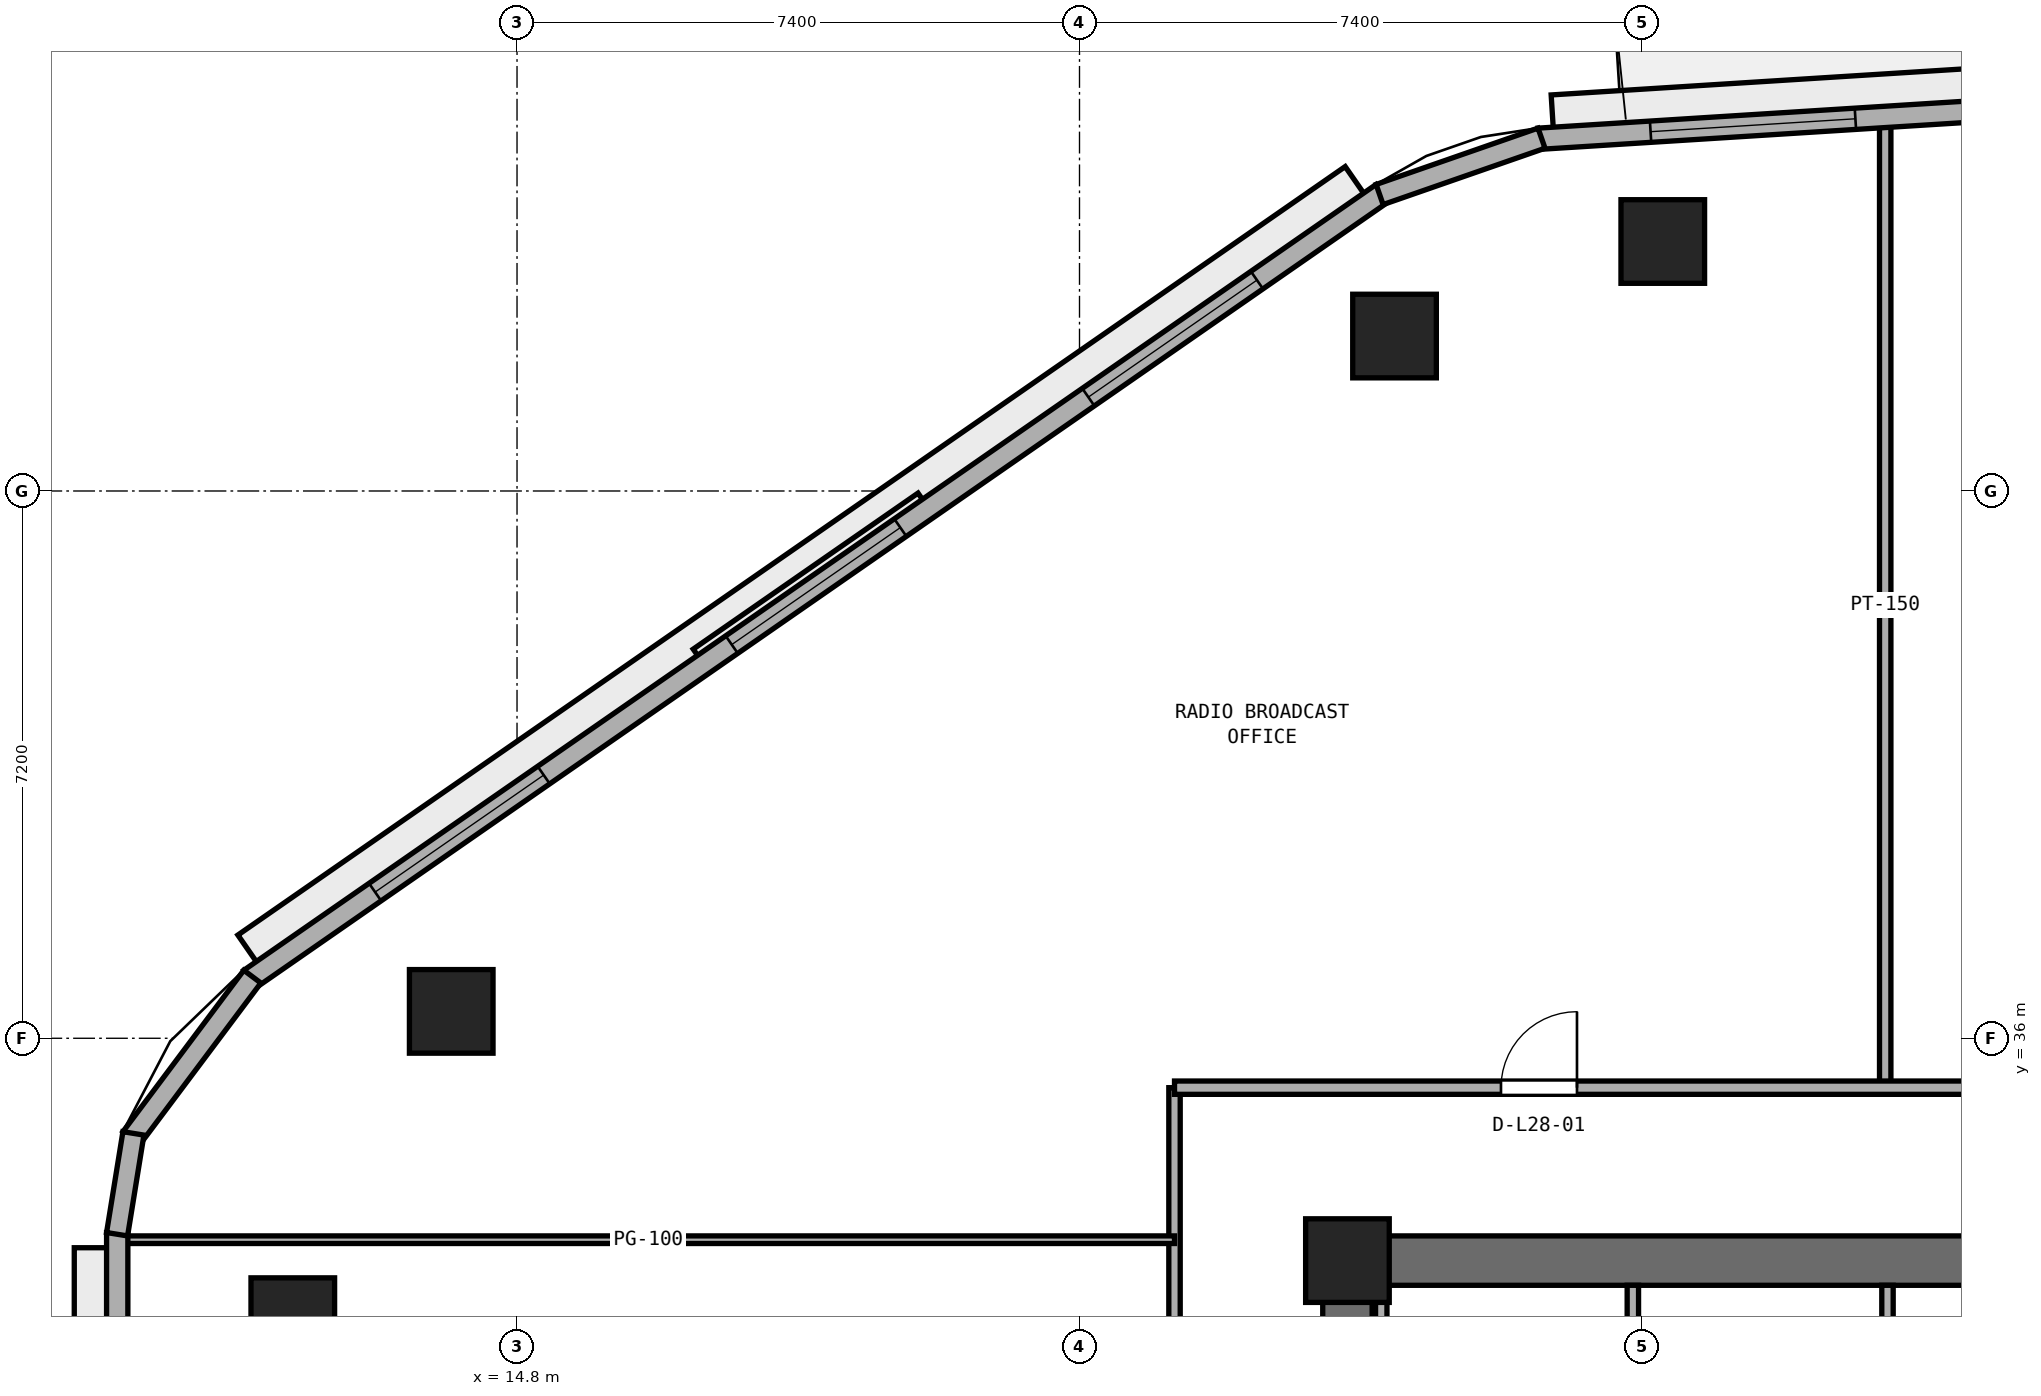
"""IFC4 building model, lengths in metres.
Left out: names, types, materials, properties, quantities, classifications, styles, units other than length and angle.
Written with IfcOpenShell. Run it as: python <this file> out.ifc"""

import sys

from ifc_helpers import new_model, si_unit, direction, frame, frame_2d, origin, origin_2d, place, context, subcontext, project, spatial, rectangle, extrude, element, fill, save


model = new_model("IFC4")
c1 = context("Model", 3, precision=1e-05, world=origin(), true_north=direction((0.0, 1.0)))
c2 = subcontext(c1, "Body", "Model", "MODEL_VIEW")
j1 = project(units=[si_unit("LENGTHUNIT", "METRE"), si_unit("PLANEANGLEUNIT", "RADIAN")], contexts=[c1])
p1 = place(None, origin())
s1 = spatial("IfcSite", under=j1, at=p1, CompositionType="ELEMENT")
p2 = place(p1, origin())
s2 = spatial("IfcBuilding", under=s1, at=p2, CompositionType="ELEMENT")
p3 = place(p2, frame((0.0, 0.0, 112.4)))
s3 = spatial("IfcBuildingStorey", under=s2, at=p3, CompositionType="ELEMENT", Elevation=112.4)
p4 = place(p3, frame((25.4, 33.075, 0.0), z_axis=(0.0, 0.0, 1.0), x_axis=(1.0, 0.0, 0.0)))
e1 = element("IfcWall", 1, at=p4, inside=s3, PredefinedType="SHEAR", context=c2, shape_type="SweptSolid", body=[
    extrude(rectangle(XDim=23.2, YDim=0.65, at=frame_2d((11.6, 0.0))), origin(), (0.0, 0.0, 1.0), 3.525),
])
p5 = place(p3, frame((25.725, 17.65, 0.0), z_axis=(0.0, 0.0, 1.0), x_axis=(0.0, 1.0, 0.0)))
e2 = element("IfcWall", 2, at=p5, inside=s3, PredefinedType="SHEAR", context=c2, shape_type="SweptSolid", body=[
    extrude(rectangle(XDim=15.1, YDim=0.65, at=frame_2d((7.55, 0.0))), origin(), (0.0, 0.0, 1.0), 3.525),
])
p6 = place(p5, frame((6.8, 0.0, 0.0)))
e3 = element("IfcOpeningElement", 3, at=p6, cuts=e2, PredefinedType="OPENING", context=c2, shape_type="SweptSolid", body=[
    extrude(rectangle(XDim=1.5, YDim=2.15, at=frame_2d((0.75, 1.075))), frame((0.0, 0.335, 0.0), z_axis=(0.0, -1.0, 0.0), x_axis=(1.0, 0.0, 0.0)), (0.0, 0.0, 1.0), 0.67),
])
p7 = place(p3, frame((25.725, 33.075, 0.0), z_axis=(0.0, 0.0, 1.0), x_axis=(1.0, 0.0, 0.0)))
e4 = element("IfcColumn", 4, at=p7, inside=s3, PredefinedType="PILASTER", context=c2, shape_type="SweptSolid", body=[
    extrude(rectangle(XDim=1.1, YDim=1.1, at=origin_2d()), origin(), (0.0, 0.0, 1.0), 3.8),
])
for number, where, z_axis, x_axis in (
    (5, (29.874, 46.482, 0.0), (0.0, 0.0, 1.0), (1.0, 0.0, 0.0)),
    (6, (26.344, 45.238, 0.0), (0.0, 0.0, 1.0), (1.0, 0.0, 0.0)),
    (7, (13.934, 36.354, 0.0), (0.0, 0.0, 1.0), (1.0, 0.0, 0.0)),
    (8, (11.85, 32.298, 0.0), (0.0, 0.0, 1.0), (1.0, 0.0, 0.0)),
):
    element("IfcColumn", number, at=place(p3, frame(where, z_axis=z_axis, x_axis=x_axis)), inside=s3, PredefinedType="COLUMN", context=c2, shape_type="SweptSolid", body=[
        extrude(rectangle(XDim=1.1, YDim=1.1, at=origin_2d()), origin(), (0.0, 0.0, 1.0), 3.8),
    ])
for number, where, z_axis, x_axis in (
    (9, (26.17, 30.65, 0.0), (0.0, 0.0, 1.0), (0.0, 1.0, 0.0)),
    (10, (29.48, 30.65, 0.0), (0.0, 0.0, 1.0), (0.0, 1.0, 0.0)),
    (11, (32.83, 30.65, 0.0), (0.0, 0.0, 1.0), (0.0, 1.0, 0.0)),
):
    element("IfcWall", number, at=place(p3, frame(where, z_axis=z_axis, x_axis=x_axis)), inside=s3, PredefinedType="PARTITIONING", context=c2, shape_type="SweptSolid", body=[
        extrude(rectangle(XDim=2.1, YDim=0.15, at=frame_2d((1.05, 0.0))), origin(), (0.0, 0.0, 1.0), 3.525),
    ])
p8 = place(p3, frame((32.8, 35.35, 0.0), z_axis=(0.0, 0.0, 1.0), x_axis=(0.0, 1.0, 0.0)))
e12 = element("IfcWall", 12, at=p8, inside=s3, PredefinedType="PARTITIONING", context=c2, shape_type="SweptSolid", body=[
    extrude(rectangle(XDim=12.707, YDim=0.15, at=frame_2d((6.353, 0.0))), origin(), (0.0, 0.0, 1.0), 3.525),
])
p9 = place(p3, frame((23.45, 15.05, 0.0), z_axis=(0.0, 0.0, 1.0), x_axis=(0.0, 1.0, 0.0)))
e13 = element("IfcWall", 13, at=p9, inside=s3, PredefinedType="PARTITIONING", context=c2, shape_type="SweptSolid", body=[
    extrude(rectangle(XDim=20.3, YDim=0.15, at=frame_2d((10.15, 0.0))), origin(), (0.0, 0.0, 1.0), 3.525),
])
p10 = place(p9, frame((8.025, 0.0, 0.0)))
e14 = element("IfcOpeningElement", 14, at=p10, cuts=e13, PredefinedType="OPENING", context=c2, shape_type="SweptSolid", body=[
    extrude(rectangle(XDim=0.9, YDim=2.1, at=frame_2d((0.45, 1.05))), frame((0.0, 0.085, 0.0), z_axis=(0.0, -1.0, 0.0), x_axis=(1.0, 0.0, 0.0)), (0.0, 0.0, 1.0), 0.17),
])
p11 = place(p9, frame((16.175, 0.0, 0.0)))
e15 = element("IfcOpeningElement", 15, at=p11, cuts=e13, PredefinedType="OPENING", context=c2, shape_type="SweptSolid", body=[
    extrude(rectangle(XDim=0.9, YDim=2.1, at=frame_2d((0.45, 1.05))), frame((0.0, 0.085, 0.0), z_axis=(0.0, -1.0, 0.0), x_axis=(1.0, 0.0, 0.0)), (0.0, 0.0, 1.0), 0.17),
])
p12 = place(p3, frame((9.605, 33.35, 0.0), z_axis=(0.0, 0.0, 1.0), x_axis=(1.0, 0.0, 0.0)))
e16 = element("IfcWall", 16, at=p12, inside=s3, PredefinedType="PARTITIONING", context=c2, shape_type="SweptSolid", body=[
    extrude(rectangle(XDim=13.845, YDim=0.1, at=frame_2d((6.922, 0.0))), origin(), (0.0, 0.0, 1.0), 3.525),
])
p13 = place(p3, frame((23.45, 35.35, 0.0), z_axis=(0.0, 0.0, 1.0), x_axis=(1.0, 0.0, 0.0)))
e17 = element("IfcWall", 17, at=p13, inside=s3, PredefinedType="PARTITIONING", context=c2, shape_type="SweptSolid", body=[
    extrude(rectangle(XDim=27.1, YDim=0.175, at=frame_2d((13.55, 0.0))), origin(), (0.0, 0.0, 1.0), 3.525),
])
p14 = place(p13, frame((4.295, 0.0, 0.0)))
e18 = element("IfcOpeningElement", 18, at=p14, cuts=e17, PredefinedType="OPENING", context=c2, shape_type="SweptSolid", body=[
    extrude(rectangle(XDim=1.0, YDim=2.12, at=frame_2d((0.5, 1.06))), frame((0.0, 0.097, 0.0), z_axis=(0.0, -1.0, 0.0), x_axis=(1.0, 0.0, 0.0)), (0.0, 0.0, 1.0), 0.195),
])
p15 = place(p13, frame((14.6, 0.0, 0.0)))
e19 = element("IfcOpeningElement", 19, at=p15, cuts=e17, PredefinedType="OPENING", context=c2, shape_type="SweptSolid", body=[
    extrude(rectangle(XDim=1.0, YDim=2.12, at=frame_2d((0.5, 1.06))), frame((0.0, 0.097, 0.0), z_axis=(0.0, -1.0, 0.0), x_axis=(1.0, 0.0, 0.0)), (0.0, 0.0, 1.0), 0.195),
])
p16 = place(p13, frame((23.405, 0.0, 0.0)))
e20 = element("IfcOpeningElement", 20, at=p16, cuts=e17, PredefinedType="OPENING", context=c2, shape_type="SweptSolid", body=[
    extrude(rectangle(XDim=0.9, YDim=2.1, at=frame_2d((0.45, 1.05))), frame((0.0, 0.097, 0.0), z_axis=(0.0, -1.0, 0.0), x_axis=(1.0, 0.0, 0.0)), (0.0, 0.0, 1.0), 0.195),
])
p17 = place(p3, frame((47.832, 49.069, 0.0), z_axis=(0.0, 0.0, 1.0), x_axis=(-0.998017725054, -0.062933460723, 0.0)))
e21 = element("IfcWall", 21, at=p17, inside=s3, PredefinedType="STANDARD", context=c2, shape_type="SweptSolid", body=[
    extrude(rectangle(XDim=19.629, YDim=0.28, at=frame_2d((9.815, 0.0))), origin(), (0.0, 0.0, 1.0), 3.525),
])
p18 = place(p17, frame((9.265, 0.0, 0.0)))
e22 = element("IfcOpeningElement", 22, at=p18, cuts=e21, PredefinedType="OPENING", context=c2, shape_type="SweptSolid", body=[
    extrude(rectangle(XDim=1.1, YDim=2.2, at=frame_2d((0.55, 1.1))), frame((0.0, 0.15, 0.0), z_axis=(0.0, -1.0, 0.0), x_axis=(1.0, 0.0, 0.0)), (0.0, 0.0, 1.0), 0.3),
])
p19 = place(p17, frame((15.455, 0.0, 0.9)))
e23 = element("IfcOpeningElement", 23, at=p19, cuts=e21, PredefinedType="OPENING", context=c2, shape_type="SweptSolid", body=[
    extrude(rectangle(XDim=2.7, YDim=1.75, at=frame_2d((1.35, 0.875))), frame((0.0, 0.15, 0.0), z_axis=(0.0, -1.0, 0.0), x_axis=(1.0, 0.0, 0.0)), (0.0, 0.0, 1.0), 0.3),
])
p20 = place(p3, frame((26.182, 47.118, 0.0), z_axis=(0.0, 0.0, 1.0), x_axis=(-0.821547956627, -0.570139417127, 0.0)))
e24 = element("IfcWall", 24, at=p20, inside=s3, PredefinedType="STANDARD", context=c2, shape_type="SweptSolid", body=[
    extrude(rectangle(XDim=18.132, YDim=0.28, at=frame_2d((9.066, 0.0))), origin(), (0.0, 0.0, 1.0), 3.525),
])
p21 = place(p20, frame((2.005, 0.0, 0.9)))
e25 = element("IfcOpeningElement", 25, at=p21, cuts=e24, PredefinedType="OPENING", context=c2, shape_type="SweptSolid", body=[
    extrude(rectangle(XDim=2.7, YDim=1.75, at=frame_2d((1.35, 0.875))), frame((0.0, 0.15, 0.0), z_axis=(0.0, -1.0, 0.0), x_axis=(1.0, 0.0, 0.0)), (0.0, 0.0, 1.0), 0.3),
])
p22 = place(p20, frame((7.716, 0.0, 0.9)))
e26 = element("IfcOpeningElement", 26, at=p22, cuts=e24, PredefinedType="OPENING", context=c2, shape_type="SweptSolid", body=[
    extrude(rectangle(XDim=2.7, YDim=1.75, at=frame_2d((1.35, 0.875))), frame((0.0, 0.15, 0.0), z_axis=(0.0, -1.0, 0.0), x_axis=(1.0, 0.0, 0.0)), (0.0, 0.0, 1.0), 0.3),
])
p23 = place(p20, frame((13.427, 0.0, 0.9)))
e27 = element("IfcOpeningElement", 27, at=p23, cuts=e24, PredefinedType="OPENING", context=c2, shape_type="SweptSolid", body=[
    extrude(rectangle(XDim=2.7, YDim=1.75, at=frame_2d((1.35, 0.875))), frame((0.0, 0.15, 0.0), z_axis=(0.0, -1.0, 0.0), x_axis=(1.0, 0.0, 0.0)), (0.0, 0.0, 1.0), 0.3),
])
p24 = place(p3, frame((9.54, 33.444, 0.0), z_axis=(0.0, 0.0, 1.0), x_axis=(0.0, -1.0, 0.0)))
e28 = element("IfcWall", 28, at=p24, inside=s3, PredefinedType="STANDARD", context=c2, shape_type="SweptSolid", body=[
    extrude(rectangle(XDim=17.301, YDim=0.28, at=frame_2d((8.65, 0.0))), origin(), (0.0, 0.0, 1.0), 3.525),
])
p25 = place(p24, frame((7.3, 0.0, 0.9)))
e29 = element("IfcOpeningElement", 29, at=p25, cuts=e28, PredefinedType="OPENING", context=c2, shape_type="SweptSolid", body=[
    extrude(rectangle(XDim=2.7, YDim=1.75, at=frame_2d((1.35, 0.875))), frame((0.0, 0.15, 0.0), z_axis=(0.0, -1.0, 0.0), x_axis=(1.0, 0.0, 0.0)), (0.0, 0.0, 1.0), 0.3),
])
p26 = place(p24, frame((12.734, 0.0, 0.9)))
e30 = element("IfcOpeningElement", 30, at=p26, cuts=e28, PredefinedType="OPENING", context=c2, shape_type="SweptSolid", body=[
    extrude(rectangle(XDim=2.7, YDim=1.75, at=frame_2d((1.35, 0.875))), frame((0.0, 0.15, 0.0), z_axis=(0.0, -1.0, 0.0), x_axis=(1.0, 0.0, 0.0)), (0.0, 0.0, 1.0), 0.3),
])
p27 = place(p3, frame((28.278, 47.842, 0.0), z_axis=(0.0, 0.0, 1.0), x_axis=(-0.9444559001, -0.328638179106, 0.0)))
e31 = element("IfcWall", 31, at=p27, inside=s3, PredefinedType="STANDARD", context=c2, shape_type="SweptSolid", body=[
    extrude(rectangle(XDim=2.255, YDim=0.28, at=frame_2d((1.128, 0.0))), origin(), (0.0, 0.0, 1.0), 3.525),
])
p28 = place(p3, frame((11.318, 36.811, 0.0), z_axis=(0.0, 0.0, 1.0), x_axis=(-0.599455152629, -0.800408345775, 0.0)))
e32 = element("IfcWall", 32, at=p28, inside=s3, PredefinedType="STANDARD", context=c2, shape_type="SweptSolid", body=[
    extrude(rectangle(XDim=2.653, YDim=0.28, at=frame_2d((1.327, 0.0))), origin(), (0.0, 0.0, 1.0), 3.525),
])
p29 = place(p3, frame((9.753, 34.749, 0.0), z_axis=(0.0, 0.0, 1.0), x_axis=(-0.160037671962, -0.987110907423, 0.0)))
e33 = element("IfcWall", 33, at=p29, inside=s3, PredefinedType="STANDARD", context=c2, shape_type="SweptSolid", body=[
    extrude(rectangle(XDim=1.344, YDim=0.28, at=frame_2d((0.672, 0.0))), origin(), (0.0, 0.0, 1.0), 3.525),
])
p30 = place(p14, origin())
e34 = element("IfcDoor", 34, at=p30, inside=s3, OperationType="SINGLE_SWING_RIGHT", PredefinedType="DOOR", context=c2, shape_type="SweptSolid", body=[
    extrude(rectangle(XDim=1.0, YDim=2.12, at=frame_2d((0.5, 1.06))), frame((0.0, 0.025, 0.0), z_axis=(0.0, -1.0, 0.0), x_axis=(1.0, 0.0, 0.0)), (0.0, 0.0, 1.0), 0.05),
])
fill(e18, e34)
p31 = place(p19, origin())
e35 = element("IfcWindow", 35, at=p31, inside=s3, PartitioningType="SINGLE_PANEL", PredefinedType="WINDOW", context=c2, shape_type="SweptSolid", body=[
    extrude(rectangle(XDim=2.7, YDim=1.75, at=frame_2d((1.35, 0.875))), frame((0.0, 0.03, 0.0), z_axis=(0.0, -1.0, 0.0), x_axis=(1.0, 0.0, 0.0)), (0.0, 0.0, 1.0), 0.06),
])
fill(e23, e35)
p32 = place(p21, origin())
e36 = element("IfcWindow", 36, at=p32, inside=s3, PartitioningType="SINGLE_PANEL", PredefinedType="WINDOW", context=c2, shape_type="SweptSolid", body=[
    extrude(rectangle(XDim=2.7, YDim=1.75, at=frame_2d((1.35, 0.875))), frame((0.0, 0.03, 0.0), z_axis=(0.0, -1.0, 0.0), x_axis=(1.0, 0.0, 0.0)), (0.0, 0.0, 1.0), 0.06),
])
fill(e25, e36)
p33 = place(p22, origin())
e37 = element("IfcWindow", 37, at=p33, inside=s3, PartitioningType="SINGLE_PANEL", PredefinedType="WINDOW", context=c2, shape_type="SweptSolid", body=[
    extrude(rectangle(XDim=2.7, YDim=1.75, at=frame_2d((1.35, 0.875))), frame((0.0, 0.03, 0.0), z_axis=(0.0, -1.0, 0.0), x_axis=(1.0, 0.0, 0.0)), (0.0, 0.0, 1.0), 0.06),
])
fill(e26, e37)
p34 = place(p23, origin())
e38 = element("IfcWindow", 38, at=p34, inside=s3, PartitioningType="SINGLE_PANEL", PredefinedType="WINDOW", context=c2, shape_type="SweptSolid", body=[
    extrude(rectangle(XDim=2.7, YDim=1.75, at=frame_2d((1.35, 0.875))), frame((0.0, 0.03, 0.0), z_axis=(0.0, -1.0, 0.0), x_axis=(1.0, 0.0, 0.0)), (0.0, 0.0, 1.0), 0.06),
])
fill(e27, e38)
save(model, sys.argv[1])
